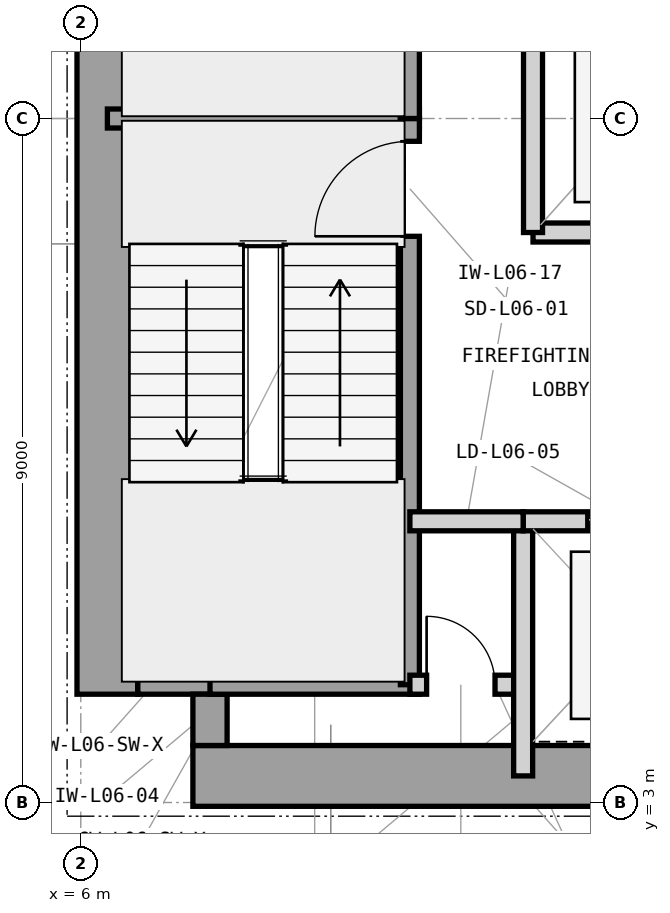
"""IFC4 building model, lengths in metres.
Left out: names, types, materials, properties, quantities, classifications, styles, units other than length and angle.
Written with IfcOpenShell. Run it as: python <this file> out.ifc"""

import sys

from ifc_helpers import new_model, si_unit, direction, frame, frame_2d, origin, place, context, subcontext, project, spatial, rectangle, extrude, element, fill, save


model = new_model("IFC4")
c1 = context("Model", 3, precision=1e-05, world=origin(), true_north=direction((0.0, 1.0)))
c2 = subcontext(c1, "Body", "Model", "MODEL_VIEW")
j1 = project(units=[si_unit("LENGTHUNIT", "METRE"), si_unit("PLANEANGLEUNIT", "RADIAN")], contexts=[c1])
p1 = place(None, origin())
s1 = spatial("IfcSite", under=j1, at=p1, CompositionType="ELEMENT")
p2 = place(p1, origin())
s2 = spatial("IfcBuilding", under=s1, at=p2, CompositionType="ELEMENT")
p3 = place(p2, frame((0.0, 0.0, 30.0)))
s3 = spatial("IfcBuildingStorey", under=s2, at=p3, CompositionType="ELEMENT", Elevation=30.0)
p4 = place(p3, frame((7.475, 3.35, 0.0), z_axis=(0.0, 0.0, 1.0), x_axis=(1.0, 0.0, 0.0)))
e1 = element("IfcWall", 1, at=p4, inside=s3, PredefinedType="SHEAR", context=c2, shape_type="SweptSolid", body=[
    extrude(rectangle(XDim=16.575, YDim=0.8, at=frame_2d((8.288, 0.0))), origin(), (0.0, 0.0, 1.0), 4.2),
])
p5 = place(p3, frame((6.35, 4.425, 0.0), z_axis=(0.0, 0.0, 1.0), x_axis=(0.0, 1.0, 0.0)))
e2 = element("IfcWall", 2, at=p5, inside=s3, PredefinedType="SHEAR", context=c2, shape_type="SweptSolid", body=[
    extrude(rectangle(XDim=15.15, YDim=0.8, at=frame_2d((7.575, 0.0))), origin(), (0.0, 0.0, 1.0), 4.2),
])
p6 = place(p3, frame((6.75, 4.65, 0.0), z_axis=(0.0, 0.0, 1.0), x_axis=(1.0, 0.0, 0.0)))
e3 = element("IfcWall", 3, at=p6, inside=s3, PredefinedType="SHEAR", context=c2, shape_type="SweptSolid", body=[
    extrude(rectangle(XDim=1.175, YDim=0.45, at=frame_2d((0.587, 0.0))), origin(), (0.0, 0.0, 1.0), 4.2),
])
p7 = place(p3, frame((7.7, 3.75, 0.0), z_axis=(0.0, 0.0, 1.0), x_axis=(0.0, 1.0, 0.0)))
e4 = element("IfcWall", 4, at=p7, inside=s3, PredefinedType="SHEAR", context=c2, shape_type="SweptSolid", body=[
    extrude(rectangle(XDim=0.675, YDim=0.45, at=frame_2d((0.337, 0.0))), origin(), (0.0, 0.0, 1.0), 4.2),
])
p8 = place(p3, frame((6.35, 12.0, 0.0), z_axis=(0.0, 0.0, 1.0), x_axis=(1.0, 0.0, 0.0)))
e5 = element("IfcWall", 5, at=p8, inside=s3, PredefinedType="SHEAR", context=c2, shape_type="SweptSolid", body=[
    extrude(rectangle(XDim=4.105, YDim=0.25, at=frame_2d((2.052, 0.0))), origin(), (0.0, 0.0, 1.0), 4.2),
])
p9 = place(p3, frame((7.7, 4.55, 0.0), z_axis=(0.0, 0.0, 1.0), x_axis=(1.0, 0.0, 0.0)))
e6 = element("IfcWall", 6, at=p9, inside=s3, PredefinedType="SHEAR", context=c2, shape_type="SweptSolid", body=[
    extrude(rectangle(XDim=2.755, YDim=0.25, at=frame_2d((1.377, 0.0))), origin(), (0.0, 0.0, 1.0), 4.2),
])
p10 = place(p3, frame((10.33, 4.55, 0.0), z_axis=(0.0, 0.0, 1.0), x_axis=(0.0, 1.0, 0.0)))
e7 = element("IfcWall", 7, at=p10, inside=s3, PredefinedType="SHEAR", context=c2, shape_type="SweptSolid", body=[
    extrude(rectangle(XDim=7.45, YDim=0.25, at=frame_2d((3.725, 0.0))), origin(), (0.0, 0.0, 1.0), 4.2),
])
p11 = place(p10, frame((5.9, 0.0, 0.0)))
e8 = element("IfcOpeningElement", 8, at=p11, cuts=e7, PredefinedType="OPENING", context=c2, shape_type="SweptSolid", body=[
    extrude(rectangle(XDim=1.25, YDim=2.2, at=frame_2d((0.625, 1.1))), frame((0.0, 0.135, 0.0), z_axis=(0.0, -1.0, 0.0), x_axis=(1.0, 0.0, 0.0)), (0.0, 0.0, 1.0), 0.27),
])
p12 = place(p3, frame((10.33, 12.0, 0.0), z_axis=(0.0, 0.0, 1.0), x_axis=(0.0, 1.0, 0.0)))
e9 = element("IfcWall", 9, at=p12, inside=s3, PredefinedType="SHEAR", context=c2, shape_type="SweptSolid", body=[
    extrude(rectangle(XDim=7.45, YDim=0.25, at=frame_2d((3.725, 0.0))), origin(), (0.0, 0.0, 1.0), 4.2),
])
p13 = place(p12, frame((5.85, 0.0, 0.0)))
e10 = element("IfcOpeningElement", 10, at=p13, cuts=e9, PredefinedType="OPENING", context=c2, shape_type="SweptSolid", body=[
    extrude(rectangle(XDim=1.25, YDim=2.2, at=frame_2d((0.625, 1.1))), frame((0.0, 0.135, 0.0), z_axis=(0.0, -1.0, 0.0), x_axis=(1.0, 0.0, 0.0)), (0.0, 0.0, 1.0), 0.27),
])
p14 = place(p3, frame((10.33, 4.55, 0.0), z_axis=(0.0, 0.0, 1.0), x_axis=(1.0, 0.0, 0.0)))
e11 = element("IfcWall", 11, at=p14, inside=s3, PredefinedType="PARTITIONING", context=c2, shape_type="SweptSolid", body=[
    extrude(rectangle(XDim=1.49, YDim=0.25, at=frame_2d((0.745, 0.0))), origin(), (0.0, 0.0, 1.0), 3.97),
])
p15 = place(p14, frame((0.22, 0.0, 0.0)))
e12 = element("IfcOpeningElement", 12, at=p15, cuts=e11, PredefinedType="OPENING", context=c2, shape_type="SweptSolid", body=[
    extrude(rectangle(XDim=0.9, YDim=2.1, at=frame_2d((0.45, 1.05))), frame((0.0, 0.135, 0.0), z_axis=(0.0, -1.0, 0.0), x_axis=(1.0, 0.0, 0.0)), (0.0, 0.0, 1.0), 0.27),
])
p16 = place(p3, frame((11.82, 3.35, 0.0), z_axis=(0.0, 0.0, 1.0), x_axis=(0.0, 1.0, 0.0)))
e13 = element("IfcWall", 13, at=p16, inside=s3, PredefinedType="PARTITIONING", context=c2, shape_type="SweptSolid", body=[
    extrude(rectangle(XDim=3.35, YDim=0.25, at=frame_2d((1.675, 0.0))), origin(), (0.0, 0.0, 1.0), 3.97),
])
p17 = place(p3, frame((11.82, 6.7, 0.0), z_axis=(0.0, 0.0, 1.0), x_axis=(1.0, 0.0, 0.0)))
e14 = element("IfcWall", 14, at=p17, inside=s3, PredefinedType="PARTITIONING", context=c2, shape_type="SweptSolid", body=[
    extrude(rectangle(XDim=2.88, YDim=0.25, at=frame_2d((1.44, 0.0))), origin(), (0.0, 0.0, 1.0), 3.426),
])
p18 = place(p17, frame((0.85, 0.0, 0.0)))
e15 = element("IfcOpeningElement", 15, at=p18, cuts=e14, PredefinedType="OPENING", context=c2, shape_type="SweptSolid", body=[
    extrude(rectangle(XDim=1.1, YDim=2.25, at=frame_2d((0.55, 1.125))), frame((0.0, 0.135, 0.0), z_axis=(0.0, -1.0, 0.0), x_axis=(1.0, 0.0, 0.0)), (0.0, 0.0, 1.0), 0.27),
])
p19 = place(p3, frame((11.95, 10.5, 0.0), z_axis=(0.0, 0.0, 1.0), x_axis=(1.0, 0.0, 0.0)))
e16 = element("IfcWall", 16, at=p19, inside=s3, PredefinedType="PARTITIONING", context=c2, shape_type="SweptSolid", body=[
    extrude(rectangle(XDim=2.75, YDim=0.25, at=frame_2d((1.375, 0.0))), origin(), (0.0, 0.0, 1.0), 3.426),
])
p20 = place(p19, frame((0.8, 0.0, 0.0)))
e17 = element("IfcOpeningElement", 17, at=p20, cuts=e16, PredefinedType="OPENING", context=c2, shape_type="SweptSolid", body=[
    extrude(rectangle(XDim=1.1, YDim=2.25, at=frame_2d((0.55, 1.125))), frame((0.0, 0.135, 0.0), z_axis=(0.0, -1.0, 0.0), x_axis=(1.0, 0.0, 0.0)), (0.0, 0.0, 1.0), 0.27),
])
p21 = place(p3, frame((11.95, 10.5, 0.0), z_axis=(0.0, 0.0, 1.0), x_axis=(0.0, 1.0, 0.0)))
e18 = element("IfcWall", 18, at=p21, inside=s3, PredefinedType="PARTITIONING", context=c2, shape_type="SweptSolid", body=[
    extrude(rectangle(XDim=3.0, YDim=0.25, at=frame_2d((1.5, 0.0))), origin(), (0.0, 0.0, 1.0), 3.97),
])
p22 = place(p3, frame((10.33, 6.7, 0.0), z_axis=(0.0, 0.0, 1.0), x_axis=(1.0, 0.0, 0.0)))
e19 = element("IfcWall", 19, at=p22, inside=s3, PredefinedType="PARTITIONING", context=c2, shape_type="SweptSolid", body=[
    extrude(rectangle(XDim=1.49, YDim=0.25, at=frame_2d((0.745, 0.0))), origin(), (0.0, 0.0, 1.0), 3.426),
])
p23 = place(p11, origin())
e20 = element("IfcDoor", 20, at=p23, inside=s3, OperationType="SINGLE_SWING_LEFT", PredefinedType="DOOR", context=c2, shape_type="SweptSolid", body=[
    extrude(rectangle(XDim=1.25, YDim=2.2, at=frame_2d((0.625, 1.1))), frame((0.0, 0.025, 0.0), z_axis=(0.0, -1.0, 0.0), x_axis=(1.0, 0.0, 0.0)), (0.0, 0.0, 1.0), 0.05),
])
fill(e8, e20)
p24 = place(p15, origin())
e21 = element("IfcDoor", 21, at=p24, inside=s3, OperationType="SINGLE_SWING_LEFT", PredefinedType="TRAPDOOR", context=c2, shape_type="SweptSolid", body=[
    extrude(rectangle(XDim=0.9, YDim=2.1, at=frame_2d((0.45, 1.05))), frame((0.0, 0.025, 0.0), z_axis=(0.0, -1.0, 0.0), x_axis=(1.0, 0.0, 0.0)), (0.0, 0.0, 1.0), 0.05),
])
fill(e12, e21)
p25 = place(p18, origin())
e22 = element("IfcDoor", 22, at=p25, inside=s3, OperationType="DOUBLE_DOOR_SLIDING", PredefinedType="DOOR", context=c2, shape_type="SweptSolid", body=[
    extrude(rectangle(XDim=1.1, YDim=2.25, at=frame_2d((0.55, 1.125))), frame((0.0, 0.025, 0.0), z_axis=(0.0, -1.0, 0.0), x_axis=(1.0, 0.0, 0.0)), (0.0, 0.0, 1.0), 0.05),
])
fill(e15, e22)
save(model, sys.argv[1])
